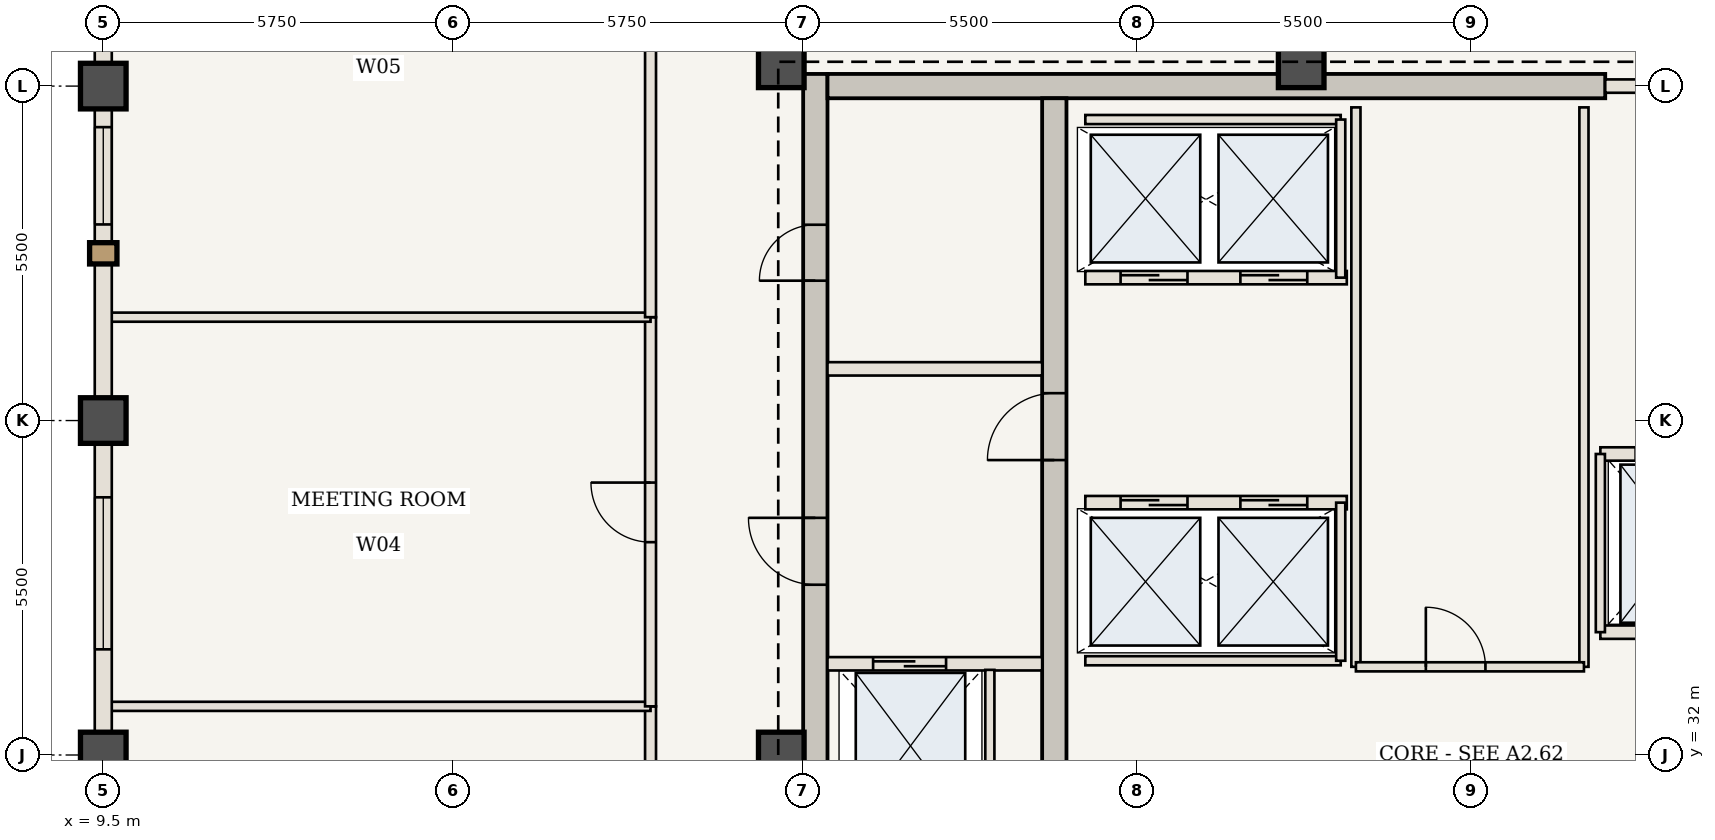
"""IFC4 building model, lengths in metres.
Left out: names, types, materials, properties, quantities, classifications, styles, units other than length and angle.
Written with IfcOpenShell. Run it as: python <this file> out.ifc"""

import sys

from ifc_helpers import new_model, si_unit, direction, frame, frame_2d, origin, origin_2d, place, context, subcontext, project, spatial, rectangle, extrude, element, fill, save


model = new_model("IFC4")
c1 = context("Model", 3, precision=1e-05, world=origin(), true_north=direction((0.0, 1.0)))
c2 = subcontext(c1, "Body", "Model", "MODEL_VIEW")
j1 = project(units=[si_unit("LENGTHUNIT", "METRE"), si_unit("PLANEANGLEUNIT", "RADIAN")], contexts=[c1])
p1 = place(None, origin())
s1 = spatial("IfcSite", under=j1, at=p1, CompositionType="ELEMENT")
p2 = place(p1, origin())
s2 = spatial("IfcBuilding", under=s1, at=p2, CompositionType="ELEMENT")
p3 = place(p2, frame((0.0, 0.0, 285.25)))
s3 = spatial("IfcBuildingStorey", under=s2, at=p3, CompositionType="ELEMENT", Elevation=285.25)
p4 = place(p3, frame((21.21, 30.6, 0.0), z_axis=(0.0, 0.0, 1.0), x_axis=(0.0, 1.0, 0.0)))
e1 = element("IfcWall", 1, at=p4, inside=s3, PredefinedType="SHEAR", context=c2, shape_type="SweptSolid", body=[
    extrude(rectangle(XDim=12.6, YDim=0.4, at=frame_2d((6.3, 0.0))), origin(), (0.0, 0.0, 1.0), 3.85),
])
p5 = place(p4, frame((4.2, 0.0, 0.0)))
e2 = element("IfcOpeningElement", 2, at=p5, cuts=e1, PredefinedType="OPENING", context=c2, shape_type="SweptSolid", body=[
    extrude(rectangle(XDim=1.1, YDim=2.15, at=frame_2d((0.55, 1.075))), frame((0.0, 0.21, 0.0), z_axis=(0.0, -1.0, 0.0), x_axis=(1.0, 0.0, 0.0)), (0.0, 0.0, 1.0), 0.42),
])
p6 = place(p4, frame((9.2, 0.0, 0.0)))
e3 = element("IfcOpeningElement", 3, at=p6, cuts=e1, PredefinedType="OPENING", context=c2, shape_type="SweptSolid", body=[
    extrude(rectangle(XDim=0.92, YDim=2.1, at=frame_2d((0.46, 1.05))), frame((0.0, 0.21, 0.0), z_axis=(0.0, -1.0, 0.0), x_axis=(1.0, 0.0, 0.0)), (0.0, 0.0, 1.0), 0.42),
])
p7 = place(p3, frame((21.41, 43.0, 0.0), z_axis=(0.0, 0.0, 1.0), x_axis=(1.0, 0.0, 0.0)))
e4 = element("IfcWall", 4, at=p7, inside=s3, PredefinedType="SHEAR", context=c2, shape_type="SweptSolid", body=[
    extrude(rectangle(XDim=12.79, YDim=0.4, at=frame_2d((6.395, 0.0))), origin(), (0.0, 0.0, 1.0), 3.85),
])
p8 = place(p3, frame((25.14, 30.6, 0.0), z_axis=(0.0, 0.0, 1.0), x_axis=(0.0, 1.0, 0.0)))
e5 = element("IfcWall", 5, at=p8, inside=s3, PredefinedType="SHEAR", context=c2, shape_type="SweptSolid", body=[
    extrude(rectangle(XDim=12.2, YDim=0.4, at=frame_2d((6.1, 0.0))), origin(), (0.0, 0.0, 1.0), 3.85),
])
p9 = place(p8, frame((6.25, 0.0, 0.0)))
e6 = element("IfcOpeningElement", 6, at=p9, cuts=e5, PredefinedType="OPENING", context=c2, shape_type="SweptSolid", body=[
    extrude(rectangle(XDim=1.1, YDim=2.15, at=frame_2d((0.55, 1.075))), frame((0.0, 0.21, 0.0), z_axis=(0.0, -1.0, 0.0), x_axis=(1.0, 0.0, 0.0)), (0.0, 0.0, 1.0), 0.42),
])
for number, where, z_axis, x_axis in (
    (7, (29.2, 43.35, 0.0), (0.0, 0.0, 1.0), (1.0, 0.0, 0.0)),
    (8, (20.65, 43.35, 0.0), (0.0, 0.0, 1.0), (1.0, 0.0, 0.0)),
    (9, (20.65, 32.0, 0.0), (0.0, 0.0, 1.0), (1.0, 0.0, 0.0)),
    (10, (9.5, 32.0, 0.0), (0.0, 0.0, 1.0), (1.0, 0.0, 0.0)),
    (11, (9.5, 37.5, 0.0), (0.0, 0.0, 1.0), (1.0, 0.0, 0.0)),
    (12, (9.5, 43.0, 0.0), (0.0, 0.0, 1.0), (1.0, 0.0, 0.0)),
):
    element("IfcColumn", number, at=place(p3, frame(where, z_axis=z_axis, x_axis=x_axis)), inside=s3, PredefinedType="COLUMN", context=c2, shape_type="SweptSolid", body=[
        extrude(rectangle(XDim=0.75, YDim=0.75, at=origin_2d()), origin(), (0.0, 0.0, 1.0), 3.85),
    ])
p10 = place(p3, frame((21.41, 33.5, 0.0), z_axis=(0.0, 0.0, 1.0), x_axis=(1.0, 0.0, 0.0)))
e13 = element("IfcWall", 13, at=p10, inside=s3, PredefinedType="STANDARD", context=c2, shape_type="SweptSolid", body=[
    extrude(rectangle(XDim=3.53, YDim=0.22, at=frame_2d((1.765, 0.0))), origin(), (0.0, 0.0, 1.0), 3.685),
])
p11 = place(p10, frame((0.75, 0.0, 0.0)))
e14 = element("IfcOpeningElement", 14, at=p11, cuts=e13, PredefinedType="OPENING", context=c2, shape_type="SweptSolid", body=[
    extrude(rectangle(XDim=1.2, YDim=2.2, at=frame_2d((0.6, 1.1))), frame((0.0, 0.12, 0.0), z_axis=(0.0, -1.0, 0.0), x_axis=(1.0, 0.0, 0.0)), (0.0, 0.0, 1.0), 0.24),
])
p12 = place(p3, frame((24.08, 30.75, 0.0), z_axis=(0.0, 0.0, 1.0), x_axis=(0.0, 1.0, 0.0)))
e15 = element("IfcWall", 15, at=p12, inside=s3, PredefinedType="STANDARD", context=c2, shape_type="SweptSolid", body=[
    extrude(rectangle(XDim=2.65, YDim=0.15, at=frame_2d((1.325, 0.0))), origin(), (0.0, 0.0, 1.0), 3.685),
])
p13 = place(p3, frame((21.41, 38.35, 0.0), z_axis=(0.0, 0.0, 1.0), x_axis=(1.0, 0.0, 0.0)))
e16 = element("IfcWall", 16, at=p13, inside=s3, PredefinedType="STANDARD", context=c2, shape_type="SweptSolid", body=[
    extrude(rectangle(XDim=3.53, YDim=0.22, at=frame_2d((1.765, 0.0))), origin(), (0.0, 0.0, 1.0), 3.685),
])
p14 = place(p3, frame((25.65, 36.15, 0.0), z_axis=(0.0, 0.0, 1.0), x_axis=(1.0, 0.0, 0.0)))
e17 = element("IfcWall", 17, at=p14, inside=s3, PredefinedType="STANDARD", context=c2, shape_type="SweptSolid", body=[
    extrude(rectangle(XDim=4.3, YDim=0.22, at=frame_2d((2.15, 0.0))), origin(), (0.0, 0.0, 1.0), 3.685),
])
p15 = place(p14, frame((0.58, 0.0, 0.0)))
e18 = element("IfcOpeningElement", 18, at=p15, cuts=e17, PredefinedType="OPENING", context=c2, shape_type="SweptSolid", body=[
    extrude(rectangle(XDim=1.1, YDim=2.15, at=frame_2d((0.55, 1.075))), frame((0.0, 0.12, 0.0), z_axis=(0.0, -1.0, 0.0), x_axis=(1.0, 0.0, 0.0)), (0.0, 0.0, 1.0), 0.24),
])
p16 = place(p14, frame((2.55, 0.0, 0.0)))
e19 = element("IfcOpeningElement", 19, at=p16, cuts=e17, PredefinedType="OPENING", context=c2, shape_type="SweptSolid", body=[
    extrude(rectangle(XDim=1.1, YDim=2.15, at=frame_2d((0.55, 1.075))), frame((0.0, 0.12, 0.0), z_axis=(0.0, -1.0, 0.0), x_axis=(1.0, 0.0, 0.0)), (0.0, 0.0, 1.0), 0.24),
])
p17 = place(p3, frame((25.65, 33.55, 0.0), z_axis=(0.0, 0.0, 1.0), x_axis=(1.0, 0.0, 0.0)))
e20 = element("IfcWall", 20, at=p17, inside=s3, PredefinedType="STANDARD", context=c2, shape_type="SweptSolid", body=[
    extrude(rectangle(XDim=4.2, YDim=0.15, at=frame_2d((2.1, 0.0))), origin(), (0.0, 0.0, 1.0), 3.685),
])
p18 = place(p3, frame((29.85, 33.55, 0.0), z_axis=(0.0, 0.0, 1.0), x_axis=(0.0, 1.0, 0.0)))
e21 = element("IfcWall", 21, at=p18, inside=s3, PredefinedType="STANDARD", context=c2, shape_type="SweptSolid", body=[
    extrude(rectangle(XDim=2.6, YDim=0.15, at=frame_2d((1.3, 0.0))), origin(), (0.0, 0.0, 1.0), 3.685),
])
p19 = place(p3, frame((25.65, 39.85, 0.0), z_axis=(0.0, 0.0, 1.0), x_axis=(1.0, 0.0, 0.0)))
e22 = element("IfcWall", 22, at=p19, inside=s3, PredefinedType="STANDARD", context=c2, shape_type="SweptSolid", body=[
    extrude(rectangle(XDim=4.3, YDim=0.22, at=frame_2d((2.15, 0.0))), origin(), (0.0, 0.0, 1.0), 3.685),
])
p20 = place(p19, frame((0.58, 0.0, 0.0)))
e23 = element("IfcOpeningElement", 23, at=p20, cuts=e22, PredefinedType="OPENING", context=c2, shape_type="SweptSolid", body=[
    extrude(rectangle(XDim=1.1, YDim=2.15, at=frame_2d((0.55, 1.075))), frame((0.0, 0.12, 0.0), z_axis=(0.0, -1.0, 0.0), x_axis=(1.0, 0.0, 0.0)), (0.0, 0.0, 1.0), 0.24),
])
p21 = place(p19, frame((2.55, 0.0, 0.0)))
e24 = element("IfcOpeningElement", 24, at=p21, cuts=e22, PredefinedType="OPENING", context=c2, shape_type="SweptSolid", body=[
    extrude(rectangle(XDim=1.1, YDim=2.15, at=frame_2d((0.55, 1.075))), frame((0.0, 0.12, 0.0), z_axis=(0.0, -1.0, 0.0), x_axis=(1.0, 0.0, 0.0)), (0.0, 0.0, 1.0), 0.24),
])
p22 = place(p3, frame((25.65, 42.45, 0.0), z_axis=(0.0, 0.0, 1.0), x_axis=(1.0, 0.0, 0.0)))
e25 = element("IfcWall", 25, at=p22, inside=s3, PredefinedType="STANDARD", context=c2, shape_type="SweptSolid", body=[
    extrude(rectangle(XDim=4.2, YDim=0.15, at=frame_2d((2.1, 0.0))), origin(), (0.0, 0.0, 1.0), 3.685),
])
p23 = place(p3, frame((29.85, 39.85, 0.0), z_axis=(0.0, 0.0, 1.0), x_axis=(0.0, 1.0, 0.0)))
e26 = element("IfcWall", 26, at=p23, inside=s3, PredefinedType="STANDARD", context=c2, shape_type="SweptSolid", body=[
    extrude(rectangle(XDim=2.6, YDim=0.15, at=frame_2d((1.3, 0.0))), origin(), (0.0, 0.0, 1.0), 3.685),
])
for number, where, z_axis, x_axis in (
    (27, (30.1, 33.45, 0.0), (0.0, 0.0, 1.0), (0.0, 1.0, 0.0)),
    (28, (33.85, 33.45, 0.0), (0.0, 0.0, 1.0), (0.0, 1.0, 0.0)),
):
    element("IfcWall", number, at=place(p3, frame(where, z_axis=z_axis, x_axis=x_axis)), inside=s3, PredefinedType="STANDARD", context=c2, shape_type="SweptSolid", body=[
        extrude(rectangle(XDim=9.2, YDim=0.15, at=frame_2d((4.6, 0.0))), origin(), (0.0, 0.0, 1.0), 3.685),
    ])
p24 = place(p3, frame((30.1, 33.45, 0.0), z_axis=(0.0, 0.0, 1.0), x_axis=(1.0, 0.0, 0.0)))
e29 = element("IfcWall", 29, at=p24, inside=s3, PredefinedType="STANDARD", context=c2, shape_type="SweptSolid", body=[
    extrude(rectangle(XDim=3.75, YDim=0.15, at=frame_2d((1.875, 0.0))), origin(), (0.0, 0.0, 1.0), 3.685),
])
p25 = place(p24, frame((1.15, 0.0, 0.0)))
e30 = element("IfcOpeningElement", 30, at=p25, cuts=e29, PredefinedType="OPENING", context=c2, shape_type="SweptSolid", body=[
    extrude(rectangle(XDim=0.98, YDim=2.2, at=frame_2d((0.49, 1.1))), frame((0.0, 0.085, 0.0), z_axis=(0.0, -1.0, 0.0), x_axis=(1.0, 0.0, 0.0)), (0.0, 0.0, 1.0), 0.17),
])
p26 = place(p3, frame((34.2, 43.0, 0.0), z_axis=(0.0, 0.0, 1.0), x_axis=(1.0, 0.0, 0.0)))
e31 = element("IfcWall", 31, at=p26, inside=s3, PredefinedType="STANDARD", context=c2, shape_type="SweptSolid", body=[
    extrude(rectangle(XDim=3.55, YDim=0.22, at=frame_2d((1.775, 0.0))), origin(), (0.0, 0.0, 1.0), 3.685),
])
p27 = place(p26, frame((1.4, 0.0, 0.0)))
e32 = element("IfcOpeningElement", 32, at=p27, cuts=e31, PredefinedType="OPENING", context=c2, shape_type="SweptSolid", body=[
    extrude(rectangle(XDim=1.1, YDim=2.15, at=frame_2d((0.55, 1.075))), frame((0.0, 0.12, 0.0), z_axis=(0.0, -1.0, 0.0), x_axis=(1.0, 0.0, 0.0)), (0.0, 0.0, 1.0), 0.24),
])
p28 = place(p3, frame((34.12, 36.95, 0.0), z_axis=(0.0, 0.0, 1.0), x_axis=(1.0, 0.0, 0.0)))
e33 = element("IfcWall", 33, at=p28, inside=s3, PredefinedType="STANDARD", context=c2, shape_type="SweptSolid", body=[
    extrude(rectangle(XDim=2.68, YDim=0.22, at=frame_2d((1.34, 0.0))), origin(), (0.0, 0.0, 1.0), 3.685),
])
p29 = place(p28, frame((0.58, 0.0, 0.0)))
e34 = element("IfcOpeningElement", 34, at=p29, cuts=e33, PredefinedType="OPENING", context=c2, shape_type="SweptSolid", body=[
    extrude(rectangle(XDim=1.2, YDim=2.2, at=frame_2d((0.6, 1.1))), frame((0.0, 0.12, 0.0), z_axis=(0.0, -1.0, 0.0), x_axis=(1.0, 0.0, 0.0)), (0.0, 0.0, 1.0), 0.24),
])
p30 = place(p3, frame((34.12, 34.02, 0.0), z_axis=(0.0, 0.0, 1.0), x_axis=(1.0, 0.0, 0.0)))
e35 = element("IfcWall", 35, at=p30, inside=s3, PredefinedType="STANDARD", context=c2, shape_type="SweptSolid", body=[
    extrude(rectangle(XDim=2.68, YDim=0.22, at=frame_2d((1.34, 0.0))), origin(), (0.0, 0.0, 1.0), 3.685),
])
p31 = place(p3, frame((34.12, 34.02, 0.0), z_axis=(0.0, 0.0, 1.0), x_axis=(0.0, 1.0, 0.0)))
e36 = element("IfcWall", 36, at=p31, inside=s3, PredefinedType="STANDARD", context=c2, shape_type="SweptSolid", body=[
    extrude(rectangle(XDim=2.93, YDim=0.15, at=frame_2d((1.465, 0.0))), origin(), (0.0, 0.0, 1.0), 3.685),
])
p32 = place(p3, frame((18.5, 26.8, 0.0), z_axis=(0.0, 0.0, 1.0), x_axis=(0.0, 1.0, 0.0)))
e37 = element("IfcWall", 37, at=p32, inside=s3, PredefinedType="STANDARD", context=c2, shape_type="SweptSolid", body=[
    extrude(rectangle(XDim=6.0, YDim=0.18, at=frame_2d((3.0, 0.0))), origin(), (0.0, 0.0, 1.0), 3.685),
])
p33 = place(p32, frame((2.5, 0.0, 0.0)))
e38 = element("IfcOpeningElement", 38, at=p33, cuts=e37, PredefinedType="OPENING", context=c2, shape_type="SweptSolid", body=[
    extrude(rectangle(XDim=0.98, YDim=2.2, at=frame_2d((0.49, 1.1))), frame((0.0, 0.1, 0.0), z_axis=(0.0, -1.0, 0.0), x_axis=(1.0, 0.0, 0.0)), (0.0, 0.0, 1.0), 0.2),
])
p34 = place(p3, frame((9.56, 32.8, 0.0), z_axis=(0.0, 0.0, 1.0), x_axis=(1.0, 0.0, 0.0)))
e39 = element("IfcWall", 39, at=p34, inside=s3, PredefinedType="STANDARD", context=c2, shape_type="SweptSolid", body=[
    extrude(rectangle(XDim=8.94, YDim=0.15, at=frame_2d((4.47, 0.0))), origin(), (0.0, 0.0, 1.0), 3.685),
])
p35 = place(p3, frame((18.5, 32.8, 0.0), z_axis=(0.0, 0.0, 1.0), x_axis=(0.0, 1.0, 0.0)))
e40 = element("IfcWall", 40, at=p35, inside=s3, PredefinedType="STANDARD", context=c2, shape_type="SweptSolid", body=[
    extrude(rectangle(XDim=6.4, YDim=0.18, at=frame_2d((3.2, 0.0))), origin(), (0.0, 0.0, 1.0), 3.685),
])
p36 = place(p35, frame((2.7, 0.0, 0.0)))
e41 = element("IfcOpeningElement", 41, at=p36, cuts=e40, PredefinedType="OPENING", context=c2, shape_type="SweptSolid", body=[
    extrude(rectangle(XDim=0.98, YDim=2.2, at=frame_2d((0.49, 1.1))), frame((0.0, 0.1, 0.0), z_axis=(0.0, -1.0, 0.0), x_axis=(1.0, 0.0, 0.0)), (0.0, 0.0, 1.0), 0.2),
])
p37 = place(p3, frame((9.56, 39.2, 0.0), z_axis=(0.0, 0.0, 1.0), x_axis=(1.0, 0.0, 0.0)))
e42 = element("IfcWall", 42, at=p37, inside=s3, PredefinedType="STANDARD", context=c2, shape_type="SweptSolid", body=[
    extrude(rectangle(XDim=8.94, YDim=0.15, at=frame_2d((4.47, 0.0))), origin(), (0.0, 0.0, 1.0), 3.685),
])
p38 = place(p3, frame((18.5, 39.2, 0.0), z_axis=(0.0, 0.0, 1.0), x_axis=(0.0, 1.0, 0.0)))
e43 = element("IfcWall", 43, at=p38, inside=s3, PredefinedType="STANDARD", context=c2, shape_type="SweptSolid", body=[
    extrude(rectangle(XDim=9.3, YDim=0.18, at=frame_2d((4.65, 0.0))), origin(), (0.0, 0.0, 1.0), 3.685),
])
p39 = place(p38, frame((5.6, 0.0, 0.0)))
e44 = element("IfcOpeningElement", 44, at=p39, cuts=e43, PredefinedType="OPENING", context=c2, shape_type="SweptSolid", body=[
    extrude(rectangle(XDim=0.98, YDim=2.2, at=frame_2d((0.49, 1.1))), frame((0.0, 0.1, 0.0), z_axis=(0.0, -1.0, 0.0), x_axis=(1.0, 0.0, 0.0)), (0.0, 0.0, 1.0), 0.2),
])
p40 = place(p3, frame((9.5, 26.5, 0.0), z_axis=(0.0, 0.0, 1.0), x_axis=(0.0, 1.0, 0.0)))
e45 = element("IfcWall", 45, at=p40, inside=s3, PredefinedType="USERDEFINED", context=c2, shape_type="SweptSolid", body=[
    extrude(rectangle(XDim=5.5, YDim=0.28, at=frame_2d((2.75, 0.0))), origin(), (0.0, 0.0, 1.0), 2.985),
])
p41 = place(p40, frame((1.5, 0.0, 0.85)))
e46 = element("IfcOpeningElement", 46, at=p41, cuts=e45, PredefinedType="OPENING", context=c2, shape_type="SweptSolid", body=[
    extrude(rectangle(XDim=2.5, YDim=1.935, at=frame_2d((1.25, 0.968))), frame((0.0, 0.15, 0.0), z_axis=(0.0, -1.0, 0.0), x_axis=(1.0, 0.0, 0.0)), (0.0, 0.0, 1.0), 0.3),
])
p42 = place(p3, frame((9.5, 32.0, 0.0), z_axis=(0.0, 0.0, 1.0), x_axis=(0.0, 1.0, 0.0)))
e47 = element("IfcWall", 47, at=p42, inside=s3, PredefinedType="USERDEFINED", context=c2, shape_type="SweptSolid", body=[
    extrude(rectangle(XDim=5.5, YDim=0.28, at=frame_2d((2.75, 0.0))), origin(), (0.0, 0.0, 1.0), 2.985),
])
p43 = place(p42, frame((1.738, 0.0, 0.85)))
e48 = element("IfcOpeningElement", 48, at=p43, cuts=e47, PredefinedType="OPENING", context=c2, shape_type="SweptSolid", body=[
    extrude(rectangle(XDim=2.5, YDim=1.935, at=frame_2d((1.25, 0.968))), frame((0.0, 0.15, 0.0), z_axis=(0.0, -1.0, 0.0), x_axis=(1.0, 0.0, 0.0)), (0.0, 0.0, 1.0), 0.3),
])
p44 = place(p3, frame((9.5, 37.5, 0.0), z_axis=(0.0, 0.0, 1.0), x_axis=(0.0, 1.0, 0.0)))
e49 = element("IfcWall", 49, at=p44, inside=s3, PredefinedType="USERDEFINED", context=c2, shape_type="SweptSolid", body=[
    extrude(rectangle(XDim=5.5, YDim=0.28, at=frame_2d((2.75, 0.0))), origin(), (0.0, 0.0, 1.0), 2.985),
])
p45 = place(p44, frame((3.225, 0.0, 0.85)))
e50 = element("IfcOpeningElement", 50, at=p45, cuts=e49, PredefinedType="OPENING", context=c2, shape_type="SweptSolid", body=[
    extrude(rectangle(XDim=1.6, YDim=1.935, at=frame_2d((0.8, 0.968))), frame((0.0, 0.15, 0.0), z_axis=(0.0, -1.0, 0.0), x_axis=(1.0, 0.0, 0.0)), (0.0, 0.0, 1.0), 0.3),
])
p46 = place(p3, frame((9.5, 43.0, 0.0), z_axis=(0.0, 0.0, 1.0), x_axis=(0.0, 1.0, 0.0)))
e51 = element("IfcWall", 51, at=p46, inside=s3, PredefinedType="USERDEFINED", context=c2, shape_type="SweptSolid", body=[
    extrude(rectangle(XDim=5.5, YDim=0.28, at=frame_2d((2.75, 0.0))), origin(), (0.0, 0.0, 1.0), 2.985),
])
p47 = place(p5, origin())
e52 = element("IfcDoor", 52, at=p47, inside=s3, OperationType="SINGLE_SWING_RIGHT", PredefinedType="DOOR", context=c2, shape_type="SweptSolid", body=[
    extrude(rectangle(XDim=1.1, YDim=2.15, at=frame_2d((0.55, 1.075))), frame((0.0, 0.025, 0.0), z_axis=(0.0, -1.0, 0.0), x_axis=(1.0, 0.0, 0.0)), (0.0, 0.0, 1.0), 0.05),
])
fill(e2, e52)
p48 = place(p9, origin())
e53 = element("IfcDoor", 53, at=p48, inside=s3, OperationType="SINGLE_SWING_LEFT", PredefinedType="DOOR", context=c2, shape_type="SweptSolid", body=[
    extrude(rectangle(XDim=1.1, YDim=2.15, at=frame_2d((0.55, 1.075))), frame((0.0, 0.025, 0.0), z_axis=(0.0, -1.0, 0.0), x_axis=(1.0, 0.0, 0.0)), (0.0, 0.0, 1.0), 0.05),
])
fill(e6, e53)
p49 = place(p6, origin())
e54 = element("IfcDoor", 54, at=p49, inside=s3, OperationType="SINGLE_SWING_LEFT", PredefinedType="DOOR", context=c2, shape_type="SweptSolid", body=[
    extrude(rectangle(XDim=0.92, YDim=2.1, at=frame_2d((0.46, 1.05))), frame((0.0, 0.025, 0.0), z_axis=(0.0, -1.0, 0.0), x_axis=(1.0, 0.0, 0.0)), (0.0, 0.0, 1.0), 0.05),
])
fill(e3, e54)
p50 = place(p11, origin())
e55 = element("IfcDoor", 55, at=p50, inside=s3, OperationType="DOUBLE_DOOR_SLIDING", PredefinedType="DOOR", context=c2, shape_type="SweptSolid", body=[
    extrude(rectangle(XDim=1.2, YDim=2.2, at=frame_2d((0.6, 1.1))), frame((0.0, 0.025, 0.0), z_axis=(0.0, -1.0, 0.0), x_axis=(1.0, 0.0, 0.0)), (0.0, 0.0, 1.0), 0.05),
])
fill(e14, e55)
p51 = place(p15, origin())
e56 = element("IfcDoor", 56, at=p51, inside=s3, OperationType="DOUBLE_DOOR_SLIDING", PredefinedType="DOOR", context=c2, shape_type="SweptSolid", body=[
    extrude(rectangle(XDim=1.1, YDim=2.15, at=frame_2d((0.55, 1.075))), frame((0.0, 0.025, 0.0), z_axis=(0.0, -1.0, 0.0), x_axis=(1.0, 0.0, 0.0)), (0.0, 0.0, 1.0), 0.05),
])
fill(e18, e56)
p52 = place(p16, origin())
e57 = element("IfcDoor", 57, at=p52, inside=s3, OperationType="DOUBLE_DOOR_SLIDING", PredefinedType="DOOR", context=c2, shape_type="SweptSolid", body=[
    extrude(rectangle(XDim=1.1, YDim=2.15, at=frame_2d((0.55, 1.075))), frame((0.0, 0.025, 0.0), z_axis=(0.0, -1.0, 0.0), x_axis=(1.0, 0.0, 0.0)), (0.0, 0.0, 1.0), 0.05),
])
fill(e19, e57)
p53 = place(p20, origin())
e58 = element("IfcDoor", 58, at=p53, inside=s3, OperationType="DOUBLE_DOOR_SLIDING", PredefinedType="DOOR", context=c2, shape_type="SweptSolid", body=[
    extrude(rectangle(XDim=1.1, YDim=2.15, at=frame_2d((0.55, 1.075))), frame((0.0, 0.025, 0.0), z_axis=(0.0, -1.0, 0.0), x_axis=(1.0, 0.0, 0.0)), (0.0, 0.0, 1.0), 0.05),
])
fill(e23, e58)
p54 = place(p21, origin())
e59 = element("IfcDoor", 59, at=p54, inside=s3, OperationType="DOUBLE_DOOR_SLIDING", PredefinedType="DOOR", context=c2, shape_type="SweptSolid", body=[
    extrude(rectangle(XDim=1.1, YDim=2.15, at=frame_2d((0.55, 1.075))), frame((0.0, 0.025, 0.0), z_axis=(0.0, -1.0, 0.0), x_axis=(1.0, 0.0, 0.0)), (0.0, 0.0, 1.0), 0.05),
])
fill(e24, e59)
p55 = place(p25, origin())
e60 = element("IfcDoor", 60, at=p55, inside=s3, OperationType="SINGLE_SWING_LEFT", PredefinedType="DOOR", context=c2, shape_type="SweptSolid", body=[
    extrude(rectangle(XDim=0.98, YDim=2.2, at=frame_2d((0.49, 1.1))), frame((0.0, 0.025, 0.0), z_axis=(0.0, -1.0, 0.0), x_axis=(1.0, 0.0, 0.0)), (0.0, 0.0, 1.0), 0.05),
])
fill(e30, e60)
p56 = place(p36, origin())
e61 = element("IfcDoor", 61, at=p56, inside=s3, OperationType="SINGLE_SWING_RIGHT", PredefinedType="DOOR", context=c2, shape_type="SweptSolid", body=[
    extrude(rectangle(XDim=0.98, YDim=2.2, at=frame_2d((0.49, 1.1))), frame((0.0, 0.025, 0.0), z_axis=(0.0, -1.0, 0.0), x_axis=(1.0, 0.0, 0.0)), (0.0, 0.0, 1.0), 0.05),
])
fill(e41, e61)
p57 = place(p43, origin())
e62 = element("IfcWindow", 62, at=p57, inside=s3, PartitioningType="SINGLE_PANEL", PredefinedType="WINDOW", context=c2, shape_type="SweptSolid", body=[
    extrude(rectangle(XDim=2.5, YDim=1.935, at=frame_2d((1.25, 0.968))), frame((0.0, 0.03, 0.0), z_axis=(0.0, -1.0, 0.0), x_axis=(1.0, 0.0, 0.0)), (0.0, 0.0, 1.0), 0.06),
])
fill(e48, e62)
p58 = place(p45, origin())
e63 = element("IfcWindow", 63, at=p58, inside=s3, PartitioningType="SINGLE_PANEL", PredefinedType="WINDOW", context=c2, shape_type="SweptSolid", body=[
    extrude(rectangle(XDim=1.6, YDim=1.935, at=frame_2d((0.8, 0.968))), frame((0.0, 0.03, 0.0), z_axis=(0.0, -1.0, 0.0), x_axis=(1.0, 0.0, 0.0)), (0.0, 0.0, 1.0), 0.06),
])
fill(e50, e63)
save(model, sys.argv[1])
